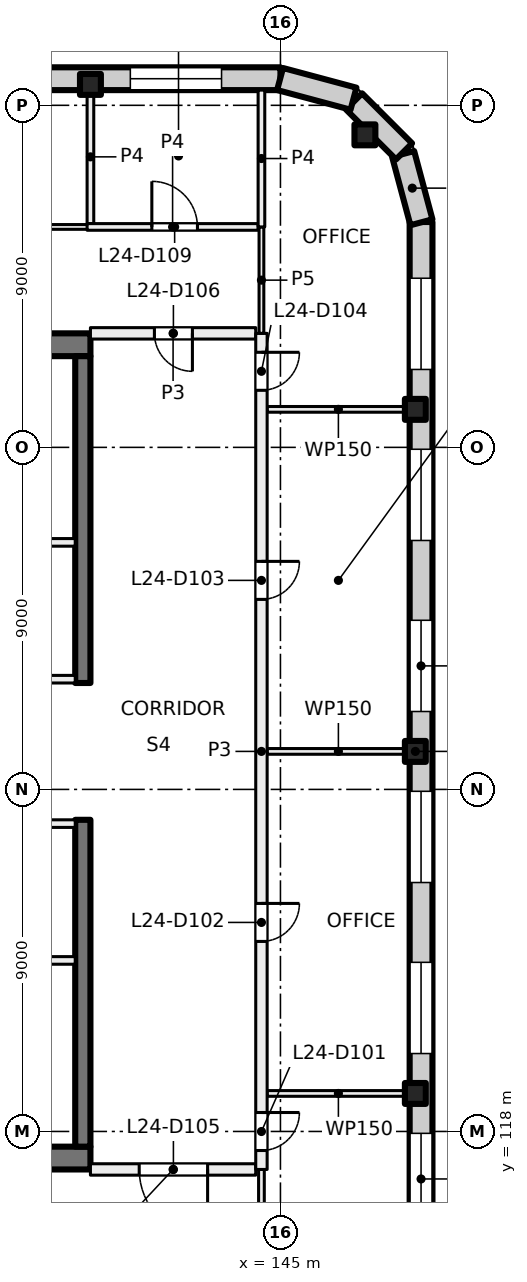
"""IFC4 building model, lengths in metres.
Left out: names, types, materials, properties, quantities, classifications, styles, units other than length and angle.
Written with IfcOpenShell. Run it as: python <this file> out.ifc"""

import sys

from ifc_helpers import new_model, si_unit, direction, frame, frame_2d, origin, origin_2d, place, context, subcontext, project, spatial, rectangle, extrude, element, fill, save


model = new_model("IFC4")
c1 = context("Model", 3, precision=1e-05, world=origin(), true_north=direction((0.0, 1.0)))
c2 = subcontext(c1, "Body", "Model", "MODEL_VIEW")
j1 = project(units=[si_unit("LENGTHUNIT", "METRE"), si_unit("PLANEANGLEUNIT", "RADIAN")], contexts=[c1])
p1 = place(None, origin())
s1 = spatial("IfcSite", under=j1, at=p1, CompositionType="ELEMENT")
p2 = place(p1, origin())
s2 = spatial("IfcBuilding", under=s1, at=p2, CompositionType="ELEMENT")
p3 = place(p2, frame((0.0, 0.0, 105.0)))
s3 = spatial("IfcBuildingStorey", under=s2, at=p3, CompositionType="ELEMENT", Elevation=105.0)
for number, where, z_axis, x_axis in (
    (1, (148.55, 119.0, 0.0), (0.0, 0.0, 1.0), (1.0, 0.0, 0.0)),
    (2, (148.55, 128.0, 0.0), (0.0, 0.0, 1.0), (1.0, 0.0, 0.0)),
    (3, (148.55, 137.0, 0.0), (0.0, 0.0, 1.0), (1.0, 0.0, 0.0)),
    (4, (140.0, 145.55, 0.0), (0.0, 0.0, 1.0), (1.0, 0.0, 0.0)),
    (5, (147.223, 144.223, 0.0), (0.0, 0.0, 1.0), (1.0, 0.0, 0.0)),
):
    element("IfcColumn", number, at=place(p3, frame(where, z_axis=z_axis, x_axis=x_axis)), inside=s3, PredefinedType="COLUMN", context=c2, shape_type="SweptSolid", body=[
        extrude(rectangle(XDim=0.55, YDim=0.55, at=origin_2d()), origin(), (0.0, 0.0, 1.0), 4.0),
    ])
for number, where, z_axis, x_axis in (
    (6, (135.4, 117.3, 0.0), (0.0, 0.0, 1.0), (1.0, 0.0, 0.0)),
    (7, (135.4, 138.7, 0.0), (0.0, 0.0, 1.0), (1.0, 0.0, 0.0)),
):
    element("IfcWall", number, at=place(p3, frame(where, z_axis=z_axis, x_axis=x_axis)), inside=s3, PredefinedType="SHEAR", context=c2, shape_type="SweptSolid", body=[
        extrude(rectangle(XDim=4.6, YDim=0.6, at=frame_2d((2.3, 0.0))), origin(), (0.0, 0.0, 1.0), 4.0),
    ])
for number, where, z_axis, x_axis in (
    (8, (139.8, 117.6, 0.0), (0.0, 0.0, 1.0), (0.0, 1.0, 0.0)),
    (9, (139.8, 129.8, 0.0), (0.0, 0.0, 1.0), (0.0, 1.0, 0.0)),
):
    element("IfcWall", number, at=place(p3, frame(where, z_axis=z_axis, x_axis=x_axis)), inside=s3, PredefinedType="SHEAR", context=c2, shape_type="SweptSolid", body=[
        extrude(rectangle(XDim=8.6, YDim=0.4, at=frame_2d((4.3, 0.0))), origin(), (0.0, 0.0, 1.0), 4.0),
    ])
p4 = place(p3, frame((131.07, 145.7, 0.0), z_axis=(0.0, 0.0, 1.0), x_axis=(1.0, 0.0, 0.0)))
e10 = element("IfcWall", 10, at=p4, inside=s3, PredefinedType="SOLIDWALL", context=c2, shape_type="SweptSolid", body=[
    extrude(rectangle(XDim=13.93, YDim=0.6, at=frame_2d((6.965, 0.0))), origin(), (0.0, 0.0, 1.0), 3.625),
])
p5 = place(p4, frame((0.98, 0.0, 0.9)))
e11 = element("IfcOpeningElement", 11, at=p5, cuts=e10, PredefinedType="OPENING", context=c2, shape_type="SweptSolid", body=[
    extrude(rectangle(XDim=2.4, YDim=2.4, at=frame_2d((1.2, 1.2))), frame((0.0, 0.31, 0.0), z_axis=(0.0, -1.0, 0.0), x_axis=(1.0, 0.0, 0.0)), (0.0, 0.0, 1.0), 0.62),
])
p6 = place(p4, frame((5.48, 0.0, 0.9)))
e12 = element("IfcOpeningElement", 12, at=p6, cuts=e10, PredefinedType="OPENING", context=c2, shape_type="SweptSolid", body=[
    extrude(rectangle(XDim=2.4, YDim=2.4, at=frame_2d((1.2, 1.2))), frame((0.0, 0.31, 0.0), z_axis=(0.0, -1.0, 0.0), x_axis=(1.0, 0.0, 0.0)), (0.0, 0.0, 1.0), 0.62),
])
p7 = place(p4, frame((9.98, 0.0, 0.9)))
e13 = element("IfcOpeningElement", 13, at=p7, cuts=e10, PredefinedType="OPENING", context=c2, shape_type="SweptSolid", body=[
    extrude(rectangle(XDim=2.4, YDim=2.4, at=frame_2d((1.2, 1.2))), frame((0.0, 0.31, 0.0), z_axis=(0.0, -1.0, 0.0), x_axis=(1.0, 0.0, 0.0)), (0.0, 0.0, 1.0), 0.62),
])
p8 = place(p3, frame((148.7, 141.93, 0.0), z_axis=(0.0, 0.0, 1.0), x_axis=(0.0, -1.0, 0.0)))
e14 = element("IfcWall", 14, at=p8, inside=s3, PredefinedType="SOLIDWALL", context=c2, shape_type="SweptSolid", body=[
    extrude(rectangle(XDim=27.93, YDim=0.6, at=frame_2d((13.965, 0.0))), origin(), (0.0, 0.0, 1.0), 3.625),
])
p9 = place(p8, frame((1.48, 0.0, 0.9)))
e15 = element("IfcOpeningElement", 15, at=p9, cuts=e14, PredefinedType="OPENING", context=c2, shape_type="SweptSolid", body=[
    extrude(rectangle(XDim=2.4, YDim=2.4, at=frame_2d((1.2, 1.2))), frame((0.0, 0.31, 0.0), z_axis=(0.0, -1.0, 0.0), x_axis=(1.0, 0.0, 0.0)), (0.0, 0.0, 1.0), 0.62),
])
p10 = place(p8, frame((5.98, 0.0, 0.9)))
e16 = element("IfcOpeningElement", 16, at=p10, cuts=e14, PredefinedType="OPENING", context=c2, shape_type="SweptSolid", body=[
    extrude(rectangle(XDim=2.4, YDim=2.4, at=frame_2d((1.2, 1.2))), frame((0.0, 0.31, 0.0), z_axis=(0.0, -1.0, 0.0), x_axis=(1.0, 0.0, 0.0)), (0.0, 0.0, 1.0), 0.62),
])
p11 = place(p8, frame((10.48, 0.0, 0.9)))
e17 = element("IfcOpeningElement", 17, at=p11, cuts=e14, PredefinedType="OPENING", context=c2, shape_type="SweptSolid", body=[
    extrude(rectangle(XDim=2.4, YDim=2.4, at=frame_2d((1.2, 1.2))), frame((0.0, 0.31, 0.0), z_axis=(0.0, -1.0, 0.0), x_axis=(1.0, 0.0, 0.0)), (0.0, 0.0, 1.0), 0.62),
])
p12 = place(p8, frame((14.98, 0.0, 0.9)))
e18 = element("IfcOpeningElement", 18, at=p12, cuts=e14, PredefinedType="OPENING", context=c2, shape_type="SweptSolid", body=[
    extrude(rectangle(XDim=2.4, YDim=2.4, at=frame_2d((1.2, 1.2))), frame((0.0, 0.31, 0.0), z_axis=(0.0, -1.0, 0.0), x_axis=(1.0, 0.0, 0.0)), (0.0, 0.0, 1.0), 0.62),
])
p13 = place(p8, frame((19.48, 0.0, 0.9)))
e19 = element("IfcOpeningElement", 19, at=p13, cuts=e14, PredefinedType="OPENING", context=c2, shape_type="SweptSolid", body=[
    extrude(rectangle(XDim=2.4, YDim=2.4, at=frame_2d((1.2, 1.2))), frame((0.0, 0.31, 0.0), z_axis=(0.0, -1.0, 0.0), x_axis=(1.0, 0.0, 0.0)), (0.0, 0.0, 1.0), 0.62),
])
p14 = place(p8, frame((23.98, 0.0, 0.9)))
e20 = element("IfcOpeningElement", 20, at=p14, cuts=e14, PredefinedType="OPENING", context=c2, shape_type="SweptSolid", body=[
    extrude(rectangle(XDim=2.4, YDim=2.4, at=frame_2d((1.2, 1.2))), frame((0.0, 0.31, 0.0), z_axis=(0.0, -1.0, 0.0), x_axis=(1.0, 0.0, 0.0)), (0.0, 0.0, 1.0), 0.62),
])
for number, where, z_axis, x_axis in (
    (21, (148.229, 143.719, 0.0), (0.0, 0.0, 1.0), (0.259, -0.966, 0.0)),
    (22, (146.936, 145.104, 0.0), (0.0, 0.0, 1.0), (0.707, -0.707, 0.0)),
):
    element("IfcWall", number, at=place(p3, frame(where, z_axis=z_axis, x_axis=x_axis)), inside=s3, PredefinedType="SOLIDWALL", context=c2, shape_type="SweptSolid", body=[
        extrude(rectangle(XDim=1.861, YDim=0.6, at=frame_2d((0.93, 0.0))), origin(), (0.0, 0.0, 1.0), 3.625),
    ])
p15 = place(p3, frame((144.99, 145.692, 0.0), z_axis=(0.0, 0.0, 1.0), x_axis=(0.965920269068, -0.258839784042, 0.0)))
e23 = element("IfcWall", 23, at=p15, inside=s3, PredefinedType="SOLIDWALL", context=c2, shape_type="SweptSolid", body=[
    extrude(rectangle(XDim=2.0, YDim=0.6, at=frame_2d((1.0, 0.0))), origin(), (0.0, 0.0, 1.0), 3.625),
])
p16 = place(p3, frame((135.0, 129.9, 0.0), z_axis=(0.0, 0.0, 1.0), x_axis=(1.0, 0.0, 0.0)))
e24 = element("IfcWall", 24, at=p16, inside=s3, PredefinedType="PARTITIONING", context=c2, shape_type="SweptSolid", body=[
    extrude(rectangle(XDim=4.6, YDim=0.2, at=frame_2d((2.3, 0.0))), origin(), (0.0, 0.0, 1.0), 3.625),
])
p17 = place(p16, frame((1.7, 0.0, 0.0)))
e25 = element("IfcOpeningElement", 25, at=p17, cuts=e24, PredefinedType="OPENING", context=c2, shape_type="SweptSolid", body=[
    extrude(rectangle(XDim=1.2, YDim=2.1, at=frame_2d((0.6, 1.05))), frame((0.0, 0.11, 0.0), z_axis=(0.0, -1.0, 0.0), x_axis=(1.0, 0.0, 0.0)), (0.0, 0.0, 1.0), 0.22),
])
p18 = place(p3, frame((135.0, 133.5, 0.0), z_axis=(0.0, 0.0, 1.0), x_axis=(1.0, 0.0, 0.0)))
e26 = element("IfcWall", 26, at=p18, inside=s3, PredefinedType="PARTITIONING", context=c2, shape_type="SweptSolid", body=[
    extrude(rectangle(XDim=4.6, YDim=0.2, at=frame_2d((2.3, 0.0))), origin(), (0.0, 0.0, 1.0), 3.625),
])
p19 = place(p18, frame((1.75, 0.0, 0.0)))
e27 = element("IfcOpeningElement", 27, at=p19, cuts=e26, PredefinedType="OPENING", context=c2, shape_type="SweptSolid", body=[
    extrude(rectangle(XDim=1.5, YDim=2.1, at=frame_2d((0.75, 1.05))), frame((0.0, 0.11, 0.0), z_axis=(0.0, -1.0, 0.0), x_axis=(1.0, 0.0, 0.0)), (0.0, 0.0, 1.0), 0.22),
])
p20 = place(p3, frame((139.6, 126.1, 0.0), z_axis=(0.0, 0.0, 1.0), x_axis=(-1.0, 0.0, 0.0)))
e28 = element("IfcWall", 28, at=p20, inside=s3, PredefinedType="PARTITIONING", context=c2, shape_type="SweptSolid", body=[
    extrude(rectangle(XDim=4.6, YDim=0.2, at=frame_2d((2.3, 0.0))), origin(), (0.0, 0.0, 1.0), 3.625),
])
p21 = place(p20, frame((1.7, 0.0, 0.0)))
e29 = element("IfcOpeningElement", 29, at=p21, cuts=e28, PredefinedType="OPENING", context=c2, shape_type="SweptSolid", body=[
    extrude(rectangle(XDim=1.2, YDim=2.1, at=frame_2d((0.6, 1.05))), frame((0.0, 0.11, 0.0), z_axis=(0.0, -1.0, 0.0), x_axis=(1.0, 0.0, 0.0)), (0.0, 0.0, 1.0), 0.22),
])
p22 = place(p3, frame((139.6, 122.5, 0.0), z_axis=(0.0, 0.0, 1.0), x_axis=(-1.0, 0.0, 0.0)))
e30 = element("IfcWall", 30, at=p22, inside=s3, PredefinedType="PARTITIONING", context=c2, shape_type="SweptSolid", body=[
    extrude(rectangle(XDim=4.6, YDim=0.2, at=frame_2d((2.3, 0.0))), origin(), (0.0, 0.0, 1.0), 3.625),
])
p23 = place(p22, frame((1.35, 0.0, 0.0)))
e31 = element("IfcOpeningElement", 31, at=p23, cuts=e30, PredefinedType="OPENING", context=c2, shape_type="SweptSolid", body=[
    extrude(rectangle(XDim=1.5, YDim=2.1, at=frame_2d((0.75, 1.05))), frame((0.0, 0.11, 0.0), z_axis=(0.0, -1.0, 0.0), x_axis=(1.0, 0.0, 0.0)), (0.0, 0.0, 1.0), 0.22),
])
p24 = place(p3, frame((131.085, 141.8, 0.0), z_axis=(0.0, 0.0, 1.0), x_axis=(1.0, 0.0, 0.0)))
e32 = element("IfcWall", 32, at=p24, inside=s3, PredefinedType="PARTITIONING", context=c2, shape_type="SweptSolid", body=[
    extrude(rectangle(XDim=8.918, YDim=0.125, at=frame_2d((4.459, 0.0))), origin(), (0.0, 0.0, 1.0), 3.625),
])
p25 = place(p24, frame((6.165, 0.0, 0.0)))
e33 = element("IfcOpeningElement", 33, at=p25, cuts=e32, PredefinedType="OPENING", context=c2, shape_type="SweptSolid", body=[
    extrude(rectangle(XDim=1.0, YDim=2.1, at=frame_2d((0.5, 1.05))), frame((0.0, 0.073, 0.0), z_axis=(0.0, -1.0, 0.0), x_axis=(1.0, 0.0, 0.0)), (0.0, 0.0, 1.0), 0.145),
])
p26 = place(p24, frame((1.798, 0.0, 0.0)))
e34 = element("IfcOpeningElement", 34, at=p26, cuts=e32, PredefinedType="OPENING", context=c2, shape_type="SweptSolid", body=[
    extrude(rectangle(XDim=0.8, YDim=2.1, at=frame_2d((0.4, 1.05))), frame((0.0, 0.073, 0.0), z_axis=(0.0, -1.0, 0.0), x_axis=(1.0, 0.0, 0.0)), (0.0, 0.0, 1.0), 0.145),
])
p27 = place(p3, frame((144.35, 139.0, 0.0), z_axis=(0.0, 0.0, 1.0), x_axis=(-1.0, 0.0, 0.0)))
e35 = element("IfcWall", 35, at=p27, inside=s3, PredefinedType="PARTITIONING", context=c2, shape_type="SweptSolid", body=[
    extrude(rectangle(XDim=4.35, YDim=0.3, at=frame_2d((2.175, 0.0))), origin(), (0.0, 0.0, 1.0), 3.625),
])
p28 = place(p27, frame((1.667, 0.0, 0.0)))
e36 = element("IfcOpeningElement", 36, at=p28, cuts=e35, PredefinedType="OPENING", context=c2, shape_type="SweptSolid", body=[
    extrude(rectangle(XDim=1.0, YDim=2.1, at=frame_2d((0.5, 1.05))), frame((0.0, 0.16, 0.0), z_axis=(0.0, -1.0, 0.0), x_axis=(1.0, 0.0, 0.0)), (0.0, 0.0, 1.0), 0.32),
])
p29 = place(p3, frame((140.0, 141.888, 0.0), z_axis=(0.0, 0.0, 1.0), x_axis=(0.0, 1.0, 0.0)))
e37 = element("IfcWall", 37, at=p29, inside=s3, PredefinedType="PARTITIONING", context=c2, shape_type="SweptSolid", body=[
    extrude(rectangle(XDim=3.512, YDim=0.175, at=frame_2d((1.756, 0.0))), origin(), (0.0, 0.0, 1.0), 3.625),
])
p30 = place(p3, frame((139.912, 141.8, 0.0), z_axis=(0.0, 0.0, 1.0), x_axis=(1.0, 0.0, 0.0)))
e38 = element("IfcWall", 38, at=p30, inside=s3, PredefinedType="PARTITIONING", context=c2, shape_type="SweptSolid", body=[
    extrude(rectangle(XDim=4.5, YDim=0.175, at=frame_2d((2.25, 0.0))), origin(), (0.0, 0.0, 1.0), 3.625),
])
p31 = place(p30, frame((1.704, 0.0, 0.0)))
e39 = element("IfcOpeningElement", 39, at=p31, cuts=e38, PredefinedType="OPENING", context=c2, shape_type="SweptSolid", body=[
    extrude(rectangle(XDim=1.2, YDim=2.1, at=frame_2d((0.6, 1.05))), frame((0.0, 0.097, 0.0), z_axis=(0.0, -1.0, 0.0), x_axis=(1.0, 0.0, 0.0)), (0.0, 0.0, 1.0), 0.195),
])
p32 = place(p3, frame((144.35, 117.0, 0.0), z_axis=(0.0, 0.0, 1.0), x_axis=(-1.0, 0.0, 0.0)))
e40 = element("IfcWall", 40, at=p32, inside=s3, PredefinedType="PARTITIONING", context=c2, shape_type="SweptSolid", body=[
    extrude(rectangle(XDim=4.35, YDim=0.3, at=frame_2d((2.175, 0.0))), origin(), (0.0, 0.0, 1.0), 3.625),
])
p33 = place(p32, frame((1.267, 0.0, 0.0)))
e41 = element("IfcOpeningElement", 41, at=p33, cuts=e40, PredefinedType="OPENING", context=c2, shape_type="SweptSolid", body=[
    extrude(rectangle(XDim=1.8, YDim=2.1, at=frame_2d((0.9, 1.05))), frame((0.0, 0.16, 0.0), z_axis=(0.0, -1.0, 0.0), x_axis=(1.0, 0.0, 0.0)), (0.0, 0.0, 1.0), 0.32),
])
p34 = place(p3, frame((144.5, 117.0, 0.0), z_axis=(0.0, 0.0, 1.0), x_axis=(0.0, -1.0, 0.0)))
e42 = element("IfcWall", 42, at=p34, inside=s3, PredefinedType="PARTITIONING", context=c2, shape_type="SweptSolid", body=[
    extrude(rectangle(XDim=6.4, YDim=0.15, at=frame_2d((3.2, 0.0))), origin(), (0.0, 0.0, 1.0), 3.625),
])
for number, where, z_axis, x_axis in (
    (43, (144.65, 119.0, 0.0), (0.0, 0.0, 1.0), (1.0, 0.0, 0.0)),
    (44, (144.65, 128.0, 0.0), (0.0, 0.0, 1.0), (1.0, 0.0, 0.0)),
    (45, (144.65, 137.0, 0.0), (0.0, 0.0, 1.0), (1.0, 0.0, 0.0)),
):
    element("IfcWall", number, at=place(p3, frame(where, z_axis=z_axis, x_axis=x_axis)), inside=s3, PredefinedType="PARTITIONING", context=c2, shape_type="SweptSolid", body=[
        extrude(rectangle(XDim=3.75, YDim=0.15, at=frame_2d((1.875, 0.0))), origin(), (0.0, 0.0, 1.0), 3.625),
    ])
p35 = place(p3, frame((144.5, 139.0, 0.0), z_axis=(0.0, 0.0, 1.0), x_axis=(0.0, -1.0, 0.0)))
e46 = element("IfcWall", 46, at=p35, inside=s3, PredefinedType="PARTITIONING", context=c2, shape_type="SweptSolid", body=[
    extrude(rectangle(XDim=22.0, YDim=0.3, at=frame_2d((11.0, 0.0))), origin(), (0.0, 0.0, 1.0), 3.625),
])
p36 = place(p35, frame((20.501, 0.0, 0.0)))
e47 = element("IfcOpeningElement", 47, at=p36, cuts=e46, PredefinedType="OPENING", context=c2, shape_type="SweptSolid", body=[
    extrude(rectangle(XDim=1.0, YDim=2.1, at=frame_2d((0.5, 1.05))), frame((0.0, 0.16, 0.0), z_axis=(0.0, -1.0, 0.0), x_axis=(1.0, 0.0, 0.0)), (0.0, 0.0, 1.0), 0.32),
])
p37 = place(p35, frame((15.0, 0.0, 0.0)))
e48 = element("IfcOpeningElement", 48, at=p37, cuts=e46, PredefinedType="OPENING", context=c2, shape_type="SweptSolid", body=[
    extrude(rectangle(XDim=1.0, YDim=2.1, at=frame_2d((0.5, 1.05))), frame((0.0, 0.16, 0.0), z_axis=(0.0, -1.0, 0.0), x_axis=(1.0, 0.0, 0.0)), (0.0, 0.0, 1.0), 0.32),
])
p38 = place(p35, frame((6.0, 0.0, 0.0)))
e49 = element("IfcOpeningElement", 49, at=p38, cuts=e46, PredefinedType="OPENING", context=c2, shape_type="SweptSolid", body=[
    extrude(rectangle(XDim=1.0, YDim=2.1, at=frame_2d((0.5, 1.05))), frame((0.0, 0.16, 0.0), z_axis=(0.0, -1.0, 0.0), x_axis=(1.0, 0.0, 0.0)), (0.0, 0.0, 1.0), 0.32),
])
p39 = place(p35, frame((0.499, 0.0, 0.0)))
e50 = element("IfcOpeningElement", 50, at=p39, cuts=e46, PredefinedType="OPENING", context=c2, shape_type="SweptSolid", body=[
    extrude(rectangle(XDim=1.0, YDim=2.1, at=frame_2d((0.5, 1.05))), frame((0.0, 0.16, 0.0), z_axis=(0.0, -1.0, 0.0), x_axis=(1.0, 0.0, 0.0)), (0.0, 0.0, 1.0), 0.32),
])
p40 = place(p3, frame((144.5, 141.8, 0.0), z_axis=(0.0, 0.0, 1.0), x_axis=(0.0, -1.0, 0.0)))
e51 = element("IfcWall", 51, at=p40, inside=s3, PredefinedType="PARTITIONING", context=c2, shape_type="SweptSolid", body=[
    extrude(rectangle(XDim=2.8, YDim=0.125, at=frame_2d((1.4, 0.0))), origin(), (0.0, 0.0, 1.0), 3.625),
])
p41 = place(p3, frame((144.5, 141.8, 0.0), z_axis=(0.0, 0.0, 1.0), x_axis=(0.0, 1.0, 0.0)))
e52 = element("IfcWall", 52, at=p41, inside=s3, PredefinedType="PARTITIONING", context=c2, shape_type="SweptSolid", body=[
    extrude(rectangle(XDim=3.6, YDim=0.175, at=frame_2d((1.8, 0.0))), origin(), (0.0, 0.0, 1.0), 3.625),
])
p42 = place(p7, origin())
e53 = element("IfcWindow", 53, at=p42, inside=s3, PartitioningType="SINGLE_PANEL", PredefinedType="WINDOW", context=c2, shape_type="SweptSolid", body=[
    extrude(rectangle(XDim=2.4, YDim=2.4, at=frame_2d((1.2, 1.2))), frame((0.0, 0.03, 0.0), z_axis=(0.0, -1.0, 0.0), x_axis=(1.0, 0.0, 0.0)), (0.0, 0.0, 1.0), 0.06),
])
fill(e13, e53)
p43 = place(p9, origin())
e54 = element("IfcWindow", 54, at=p43, inside=s3, PartitioningType="SINGLE_PANEL", PredefinedType="WINDOW", context=c2, shape_type="SweptSolid", body=[
    extrude(rectangle(XDim=2.4, YDim=2.4, at=frame_2d((1.2, 1.2))), frame((0.0, 0.03, 0.0), z_axis=(0.0, -1.0, 0.0), x_axis=(1.0, 0.0, 0.0)), (0.0, 0.0, 1.0), 0.06),
])
fill(e15, e54)
p44 = place(p10, origin())
e55 = element("IfcWindow", 55, at=p44, inside=s3, PartitioningType="SINGLE_PANEL", PredefinedType="WINDOW", context=c2, shape_type="SweptSolid", body=[
    extrude(rectangle(XDim=2.4, YDim=2.4, at=frame_2d((1.2, 1.2))), frame((0.0, 0.03, 0.0), z_axis=(0.0, -1.0, 0.0), x_axis=(1.0, 0.0, 0.0)), (0.0, 0.0, 1.0), 0.06),
])
fill(e16, e55)
p45 = place(p11, origin())
e56 = element("IfcWindow", 56, at=p45, inside=s3, PartitioningType="SINGLE_PANEL", PredefinedType="WINDOW", context=c2, shape_type="SweptSolid", body=[
    extrude(rectangle(XDim=2.4, YDim=2.4, at=frame_2d((1.2, 1.2))), frame((0.0, 0.03, 0.0), z_axis=(0.0, -1.0, 0.0), x_axis=(1.0, 0.0, 0.0)), (0.0, 0.0, 1.0), 0.06),
])
fill(e17, e56)
p46 = place(p12, origin())
e57 = element("IfcWindow", 57, at=p46, inside=s3, PartitioningType="SINGLE_PANEL", PredefinedType="WINDOW", context=c2, shape_type="SweptSolid", body=[
    extrude(rectangle(XDim=2.4, YDim=2.4, at=frame_2d((1.2, 1.2))), frame((0.0, 0.03, 0.0), z_axis=(0.0, -1.0, 0.0), x_axis=(1.0, 0.0, 0.0)), (0.0, 0.0, 1.0), 0.06),
])
fill(e18, e57)
p47 = place(p13, origin())
e58 = element("IfcWindow", 58, at=p47, inside=s3, PartitioningType="SINGLE_PANEL", PredefinedType="WINDOW", context=c2, shape_type="SweptSolid", body=[
    extrude(rectangle(XDim=2.4, YDim=2.4, at=frame_2d((1.2, 1.2))), frame((0.0, 0.03, 0.0), z_axis=(0.0, -1.0, 0.0), x_axis=(1.0, 0.0, 0.0)), (0.0, 0.0, 1.0), 0.06),
])
fill(e19, e58)
p48 = place(p14, origin())
e59 = element("IfcWindow", 59, at=p48, inside=s3, PartitioningType="SINGLE_PANEL", PredefinedType="WINDOW", context=c2, shape_type="SweptSolid", body=[
    extrude(rectangle(XDim=2.4, YDim=2.4, at=frame_2d((1.2, 1.2))), frame((0.0, 0.03, 0.0), z_axis=(0.0, -1.0, 0.0), x_axis=(1.0, 0.0, 0.0)), (0.0, 0.0, 1.0), 0.06),
])
fill(e20, e59)
p49 = place(p36, origin())
e60 = element("IfcDoor", 60, at=p49, inside=s3, OperationType="SINGLE_SWING_LEFT", PredefinedType="DOOR", context=c2, shape_type="SweptSolid", body=[
    extrude(rectangle(XDim=1.0, YDim=2.1, at=frame_2d((0.5, 1.05))), frame((0.0, 0.025, 0.0), z_axis=(0.0, -1.0, 0.0), x_axis=(1.0, 0.0, 0.0)), (0.0, 0.0, 1.0), 0.05),
])
fill(e47, e60)
p50 = place(p37, origin())
e61 = element("IfcDoor", 61, at=p50, inside=s3, OperationType="SINGLE_SWING_LEFT", PredefinedType="DOOR", context=c2, shape_type="SweptSolid", body=[
    extrude(rectangle(XDim=1.0, YDim=2.1, at=frame_2d((0.5, 1.05))), frame((0.0, 0.025, 0.0), z_axis=(0.0, -1.0, 0.0), x_axis=(1.0, 0.0, 0.0)), (0.0, 0.0, 1.0), 0.05),
])
fill(e48, e61)
p51 = place(p38, origin())
e62 = element("IfcDoor", 62, at=p51, inside=s3, OperationType="SINGLE_SWING_LEFT", PredefinedType="DOOR", context=c2, shape_type="SweptSolid", body=[
    extrude(rectangle(XDim=1.0, YDim=2.1, at=frame_2d((0.5, 1.05))), frame((0.0, 0.025, 0.0), z_axis=(0.0, -1.0, 0.0), x_axis=(1.0, 0.0, 0.0)), (0.0, 0.0, 1.0), 0.05),
])
fill(e49, e62)
p52 = place(p39, origin())
e63 = element("IfcDoor", 63, at=p52, inside=s3, OperationType="SINGLE_SWING_LEFT", PredefinedType="DOOR", context=c2, shape_type="SweptSolid", body=[
    extrude(rectangle(XDim=1.0, YDim=2.1, at=frame_2d((0.5, 1.05))), frame((0.0, 0.025, 0.0), z_axis=(0.0, -1.0, 0.0), x_axis=(1.0, 0.0, 0.0)), (0.0, 0.0, 1.0), 0.05),
])
fill(e50, e63)
p53 = place(p33, origin())
e64 = element("IfcDoor", 64, at=p53, inside=s3, OperationType="DOUBLE_DOOR_SINGLE_SWING", PredefinedType="DOOR", context=c2, shape_type="SweptSolid", body=[
    extrude(rectangle(XDim=1.8, YDim=2.1, at=frame_2d((0.9, 1.05))), frame((0.0, 0.025, 0.0), z_axis=(0.0, -1.0, 0.0), x_axis=(1.0, 0.0, 0.0)), (0.0, 0.0, 1.0), 0.05),
])
fill(e41, e64)
p54 = place(p28, origin())
e65 = element("IfcDoor", 65, at=p54, inside=s3, OperationType="SINGLE_SWING_LEFT", PredefinedType="DOOR", context=c2, shape_type="SweptSolid", body=[
    extrude(rectangle(XDim=1.0, YDim=2.1, at=frame_2d((0.5, 1.05))), frame((0.0, 0.025, 0.0), z_axis=(0.0, -1.0, 0.0), x_axis=(1.0, 0.0, 0.0)), (0.0, 0.0, 1.0), 0.05),
])
fill(e36, e65)
p55 = place(p31, origin())
e66 = element("IfcDoor", 66, at=p55, inside=s3, OperationType="DOUBLE_DOOR_SINGLE_SWING", PredefinedType="DOOR", context=c2, shape_type="SweptSolid", body=[
    extrude(rectangle(XDim=1.2, YDim=2.1, at=frame_2d((0.6, 1.05))), frame((0.0, 0.025, 0.0), z_axis=(0.0, -1.0, 0.0), x_axis=(1.0, 0.0, 0.0)), (0.0, 0.0, 1.0), 0.05),
])
fill(e39, e66)
save(model, sys.argv[1])
